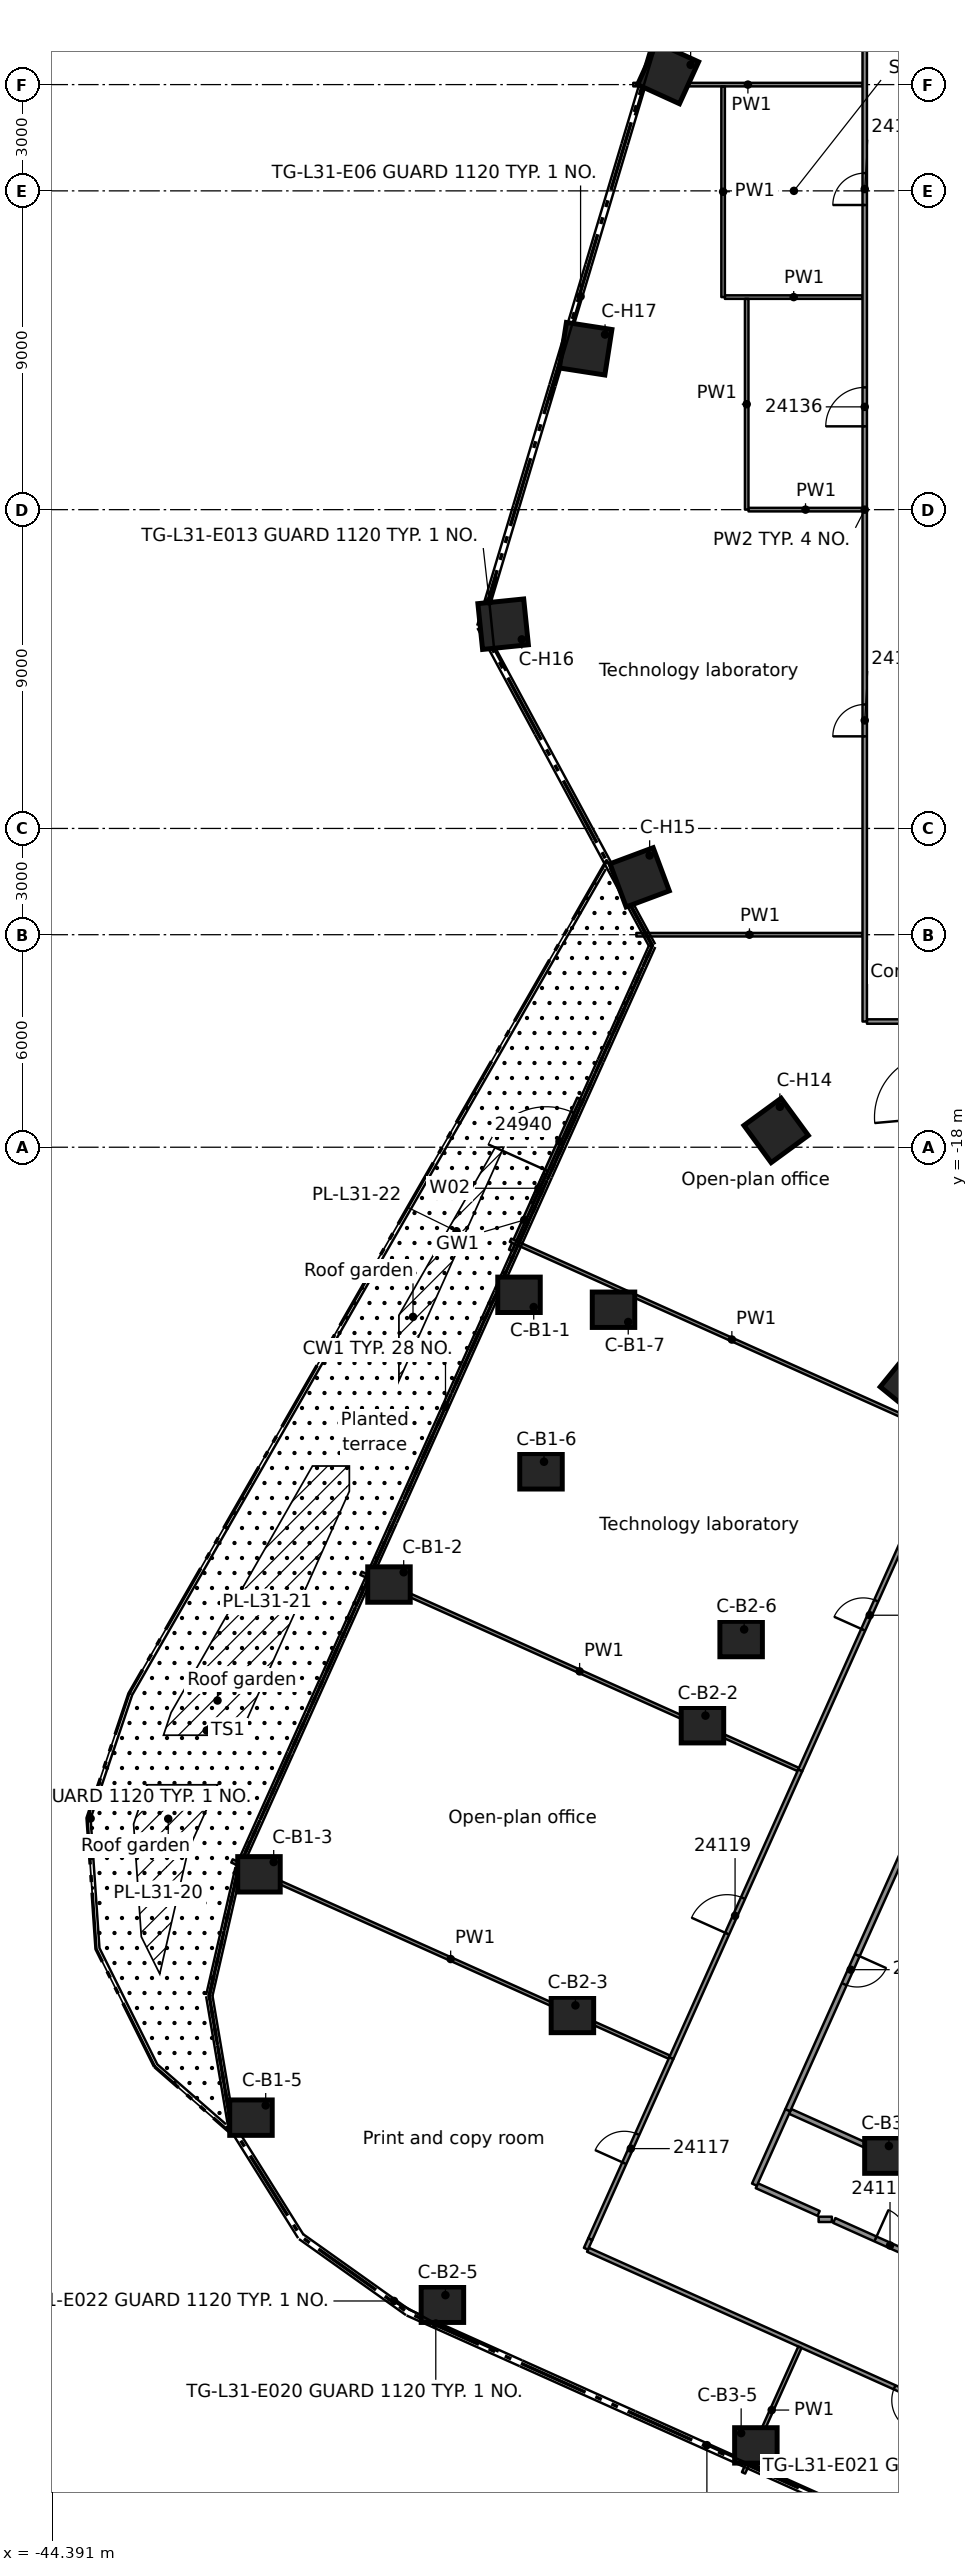
"""IFC4 building model, lengths in metres.
Left out: names, types, materials, properties, quantities, classifications, styles, units other than length and angle.
Written with IfcOpenShell. Run it as: python <this file> out.ifc"""

import sys

from ifc_helpers import new_model, si_unit, direction, frame, frame_2d, origin, origin_2d, place, context, subcontext, project, spatial, rectangle, extrude, element, fill, save


model = new_model("IFC4")
c1 = context("Model", 3, precision=1e-05, world=origin(), true_north=direction((0.0, 1.0)))
c2 = subcontext(c1, "Body", "Model", "MODEL_VIEW")
j1 = project(units=[si_unit("LENGTHUNIT", "METRE"), si_unit("PLANEANGLEUNIT", "RADIAN")], contexts=[c1])
p1 = place(None, origin())
s1 = spatial("IfcSite", under=j1, at=p1, CompositionType="ELEMENT")
p2 = place(p1, origin())
s2 = spatial("IfcBuilding", under=s1, at=p2, CompositionType="ELEMENT")
p3 = place(p2, frame((0.0, 0.0, 123.7)))
s3 = spatial("IfcBuildingStorey", under=s2, at=p3, CompositionType="ELEMENT", Elevation=123.7)
for number, where, z_axis, x_axis in (
    (1, (-31.21, -22.166, 0.0), (0.0, 0.0, 1.0), (1.0, 0.0, 0.0)),
    (2, (-34.881, -30.346, 0.0), (0.0, 0.0, 1.0), (1.0, 0.0, 0.0)),
    (3, (-38.551, -38.527, 0.0), (0.0, 0.0, 1.0), (1.0, 0.0, 0.0)),
    (4, (-38.777, -45.397, 0.0), (0.0, 0.0, 1.0), (1.0, 0.0, 0.0)),
    (5, (-30.589, -27.15, 0.0), (0.0, 0.0, 1.0), (1.0, 0.0, 0.0)),
    (6, (-28.542, -22.588, 0.0), (0.0, 0.0, 1.0), (1.0, 0.0, 0.0)),
    (7, (-26.031, -34.318, 0.0), (0.0, 0.0, 1.0), (1.0, 0.0, 0.0)),
    (8, (-29.702, -42.498, 0.0), (0.0, 0.0, 1.0), (1.0, 0.0, 0.0)),
    (9, (-33.372, -50.679, 0.0), (0.0, 0.0, 1.0), (1.0, 0.0, 0.0)),
    (10, (-24.939, -31.885, 0.0), (0.0, 0.0, 1.0), (1.0, 0.0, 0.0)),
    (11, (-20.852, -46.469, 0.0), (0.0, 0.0, 1.0), (1.0, 0.0, 0.0)),
    (12, (-24.523, -54.65, 0.0), (0.0, 0.0, 1.0), (1.0, 0.0, 0.0)),
):
    element("IfcColumn", number, at=place(p3, frame(where, z_axis=z_axis, x_axis=x_axis)), inside=s3, PredefinedType="COLUMN", context=c2, shape_type="SweptSolid", body=[
        extrude(rectangle(XDim=1.2, YDim=1.0, at=origin_2d()), origin(), (0.0, 0.0, 1.0), 3.5),
    ])
for number, where, z_axis, x_axis in (
    (13, (-20.098, -24.672, 0.0), (0.0, 0.0, 1.0), (-0.632, -0.775, 0.0)),
    (14, (-23.951, -17.526, 0.0), (0.0, 0.0, 1.0), (-0.807, -0.591, 0.0)),
    (15, (-27.804, -10.38, 0.0), (0.0, 0.0, 1.0), (-0.937, -0.35, 0.0)),
    (16, (-31.658, -3.234, 0.0), (0.0, 0.0, 1.0), (-0.995, -0.102, 0.0)),
    (17, (-29.329, 4.543, 0.0), (0.0, 0.0, 1.0), (-0.988, 0.153, 0.0)),
    (18, (-27.001, 12.321, 0.0), (0.0, 0.0, 1.0), (-0.91, 0.415, 0.0)),
):
    element("IfcColumn", number, at=place(p3, frame(where, z_axis=z_axis, x_axis=x_axis)), inside=s3, PredefinedType="COLUMN", context=c2, shape_type="SweptSolid", body=[
        extrude(rectangle(XDim=1.3, YDim=1.3, at=origin_2d()), origin(), (0.0, 0.0, 1.0), 3.5),
    ])
p4 = place(p3, frame((-31.447, -20.912, 0.0), z_axis=(0.0, 0.0, 1.0), x_axis=(0.409400034272, 0.912354981319, 0.0)))
e19 = element("IfcWall", 19, at=p4, inside=s3, PredefinedType="STANDARD", context=c2, shape_type="SweptSolid", body=[
    extrude(rectangle(XDim=4.705, YDim=0.1, at=frame_2d((2.353, 0.0))), origin(), (0.0, 0.0, 1.0), 3.1),
])
p5 = place(p4, frame((2.472, 0.0, 0.0)))
e20 = element("IfcOpeningElement", 20, at=p5, cuts=e19, PredefinedType="OPENING", context=c2, shape_type="SweptSolid", body=[
    extrude(rectangle(XDim=1.8, YDim=2.4, at=frame_2d((0.9, 1.2))), frame((0.0, 0.06, 0.0), z_axis=(0.0, -1.0, 0.0), x_axis=(1.0, 0.0, 0.0)), (0.0, 0.0, 1.0), 0.12),
])
p6 = place(p4, frame((1.472, 0.0, 0.0)))
e21 = element("IfcOpeningElement", 21, at=p6, cuts=e19, PredefinedType="OPENING", context=c2, shape_type="SweptSolid", body=[
    extrude(rectangle(XDim=0.9, YDim=2.4, at=frame_2d((0.45, 1.2))), frame((0.0, 0.06, 0.0), z_axis=(0.0, -1.0, 0.0), x_axis=(1.0, 0.0, 0.0)), (0.0, 0.0, 1.0), 0.12),
])
p7 = place(p3, frame((-17.239, -54.521, 0.0), z_axis=(0.0, 0.0, 1.0), x_axis=(-0.912380528424, 0.409343097355, 0.0)))
e22 = element("IfcWall", 22, at=p7, inside=s3, PredefinedType="PARTITIONING", context=c2, shape_type="SweptSolid", body=[
    extrude(rectangle(XDim=13.18, YDim=0.125, at=frame_2d((6.59, 0.0))), origin(), (0.0, 0.0, 1.0), 3.08),
])
p8 = place(p7, frame((2.792, 0.0, 0.0)))
e23 = element("IfcOpeningElement", 23, at=p8, cuts=e22, PredefinedType="OPENING", context=c2, shape_type="SweptSolid", body=[
    extrude(rectangle(XDim=0.9, YDim=2.1, at=frame_2d((0.45, 1.05))), frame((0.0, 0.073, 0.0), z_axis=(0.0, -1.0, 0.0), x_axis=(1.0, 0.0, 0.0)), (0.0, 0.0, 1.0), 0.145),
])
p9 = place(p3, frame((-24.496, -47.319, 0.0), z_axis=(0.0, 0.0, 1.0), x_axis=(0.912484662613, -0.409110914663, 0.0)))
e24 = element("IfcWall", 24, at=p9, inside=s3, PredefinedType="PARTITIONING", context=c2, shape_type="SweptSolid", body=[
    extrude(rectangle(XDim=1.911, YDim=0.15, at=frame_2d((0.956, 0.0))), origin(), (0.0, 0.0, 1.0), 3.08),
])
p10 = place(p3, frame((-22.31, -48.3, 0.0), z_axis=(0.0, 0.0, 1.0), x_axis=(0.912496069824, -0.409085470966, 0.0)))
e25 = element("IfcWall", 25, at=p10, inside=s3, PredefinedType="PARTITIONING", context=c2, shape_type="SweptSolid", body=[
    extrude(rectangle(XDim=3.556, YDim=0.15, at=frame_2d((1.778, 0.0))), origin(), (0.0, 0.0, 1.0), 3.08),
])
p11 = place(p10, frame((1.275, 0.0, 0.0)))
e26 = element("IfcOpeningElement", 26, at=p11, cuts=e25, PredefinedType="OPENING", context=c2, shape_type="SweptSolid", body=[
    extrude(rectangle(XDim=0.9, YDim=2.1, at=frame_2d((0.45, 1.05))), frame((0.0, 0.085, 0.0), z_axis=(0.0, -1.0, 0.0), x_axis=(1.0, 0.0, 0.0)), (0.0, 0.0, 1.0), 0.17),
])
p12 = place(p3, frame((-39.313, -38.149, 0.0), z_axis=(0.0, 0.0, 1.0), x_axis=(0.912365533099, -0.409376518638, 0.0)))
e27 = element("IfcWall", 27, at=p12, inside=s3, PredefinedType="PARTITIONING", context=c2, shape_type="SweptSolid", body=[
    extrude(rectangle(XDim=13.533, YDim=0.1, at=frame_2d((6.767, 0.0))), origin(), (0.0, 0.0, 1.0), 3.08),
])
p13 = place(p3, frame((-23.556, -45.22, 0.0), z_axis=(0.0, 0.0, 1.0), x_axis=(0.912409553787, -0.409278396886, 0.0)))
e28 = element("IfcWall", 28, at=p13, inside=s3, PredefinedType="PARTITIONING", context=c2, shape_type="SweptSolid", body=[
    extrude(rectangle(XDim=5.954, YDim=0.15, at=frame_2d((2.977, 0.0))), origin(), (0.0, 0.0, 1.0), 3.08),
])
p14 = place(p3, frame((-35.67, -30.029, 0.0), z_axis=(0.0, 0.0, 1.0), x_axis=(0.912365708641, -0.409376127413, 0.0)))
e29 = element("IfcWall", 29, at=p14, inside=s3, PredefinedType="PARTITIONING", context=c2, shape_type="SweptSolid", body=[
    extrude(rectangle(XDim=13.528, YDim=0.1, at=frame_2d((6.764, 0.0))), origin(), (0.0, 0.0, 1.0), 3.08),
])
p15 = place(p3, frame((-31.45, -20.625, 0.0), z_axis=(0.0, 0.0, 1.0), x_axis=(0.912363829072, -0.409380316334, 0.0)))
e30 = element("IfcWall", 30, at=p15, inside=s3, PredefinedType="PARTITIONING", context=c2, shape_type="SweptSolid", body=[
    extrude(rectangle(XDim=13.698, YDim=0.1, at=frame_2d((6.849, 0.0))), origin(), (0.0, 0.0, 1.0), 3.08),
])
p16 = place(p3, frame((-22.752, -48.268, 0.0), z_axis=(0.0, 0.0, 1.0), x_axis=(1.0, 0.0, 0.0)))
e31 = element("IfcWall", 31, at=p16, inside=s3, PredefinedType="PARTITIONING", context=c2, shape_type="SweptSolid", body=[
    extrude(rectangle(XDim=0.374, YDim=0.15, at=frame_2d((0.187, 0.0))), origin(), (0.0, 0.0, 1.0), 3.08),
])
p17 = place(p3, frame((-21.387, -14.451, 0.0), z_axis=(0.0, 0.0, 1.0), x_axis=(1.0, 0.0, 0.0)))
e32 = element("IfcWall", 32, at=p17, inside=s3, PredefinedType="PARTITIONING", context=c2, shape_type="SweptSolid", body=[
    extrude(rectangle(XDim=1.771, YDim=0.125, at=frame_2d((0.885, 0.0))), origin(), (0.0, 0.0, 1.0), 3.08),
])
p18 = place(p3, frame((-27.897, -12.0, 0.0), z_axis=(0.0, 0.0, 1.0), x_axis=(1.0, 0.0, 0.0)))
e33 = element("IfcWall", 33, at=p18, inside=s3, PredefinedType="PARTITIONING", context=c2, shape_type="SweptSolid", body=[
    extrude(rectangle(XDim=6.385, YDim=0.1, at=frame_2d((3.192, 0.0))), origin(), (0.0, 0.0, 1.0), 3.08),
])
p19 = place(p3, frame((-24.731, 0.001, 0.0), z_axis=(0.0, 0.0, 1.0), x_axis=(1.0, 0.0, 0.0)))
e34 = element("IfcWall", 34, at=p19, inside=s3, PredefinedType="PARTITIONING", context=c2, shape_type="SweptSolid", body=[
    extrude(rectangle(XDim=3.219, YDim=0.1, at=frame_2d((1.609, 0.0))), origin(), (0.0, 0.0, 1.0), 3.08),
])
p20 = place(p3, frame((-25.398, 6.001, 0.0), z_axis=(0.0, 0.0, 1.0), x_axis=(1.0, 0.0, 0.0)))
e35 = element("IfcWall", 35, at=p20, inside=s3, PredefinedType="PARTITIONING", context=c2, shape_type="SweptSolid", body=[
    extrude(rectangle(XDim=3.886, YDim=0.1, at=frame_2d((1.943, 0.0))), origin(), (0.0, 0.0, 1.0), 3.08),
])
p21 = place(p3, frame((-27.984, 12.0, 0.0), z_axis=(0.0, 0.0, 1.0), x_axis=(1.0, 0.0, 0.0)))
e36 = element("IfcWall", 36, at=p21, inside=s3, PredefinedType="PARTITIONING", context=c2, shape_type="SweptSolid", body=[
    extrude(rectangle(XDim=6.472, YDim=0.1, at=frame_2d((3.236, 0.0))), origin(), (0.0, 0.0, 1.0), 3.08),
])
p22 = place(p3, frame((-24.871, -55.425, 0.0), z_axis=(0.0, 0.0, 1.0), x_axis=(0.409358881384, 0.912373446694, 0.0)))
e37 = element("IfcWall", 37, at=p22, inside=s3, PredefinedType="PARTITIONING", context=c2, shape_type="SweptSolid", body=[
    extrude(rectangle(XDim=3.887, YDim=0.1, at=frame_2d((1.943, 0.0))), origin(), (0.0, 0.0, 1.0), 3.08),
])
p23 = place(p3, frame((-14.393, -24.585, 0.0), z_axis=(0.0, 0.0, 1.0), x_axis=(-0.408859666491, -0.912597267756, 0.0)))
e38 = element("IfcWall", 38, at=p23, inside=s3, PredefinedType="PARTITIONING", context=c2, shape_type="SweptSolid", body=[
    extrude(rectangle(XDim=22.577, YDim=0.15, at=frame_2d((11.289, 0.0))), origin(), (0.0, 0.0, 1.0), 3.08),
])
p24 = place(p23, frame((17.777, 0.0, 0.0)))
e39 = element("IfcOpeningElement", 39, at=p24, cuts=e38, PredefinedType="OPENING", context=c2, shape_type="SweptSolid", body=[
    extrude(rectangle(XDim=0.9, YDim=2.1, at=frame_2d((0.45, 1.05))), frame((0.0, 0.085, 0.0), z_axis=(0.0, -1.0, 0.0), x_axis=(1.0, 0.0, 0.0)), (0.0, 0.0, 1.0), 0.17),
])
p25 = place(p3, frame((-24.564, -47.288, 0.0), z_axis=(0.0, 0.0, 1.0), x_axis=(0.408677932569, 0.912678666033, 0.0)))
e40 = element("IfcWall", 40, at=p25, inside=s3, PredefinedType="PARTITIONING", context=c2, shape_type="SweptSolid", body=[
    extrude(rectangle(XDim=2.3, YDim=0.15, at=frame_2d((1.15, 0.0))), origin(), (0.0, 0.0, 1.0), 3.08),
])
p26 = place(p3, frame((-29.199, -48.826, 0.0), z_axis=(0.0, 0.0, 1.0), x_axis=(0.408903193062, 0.912577765839, 0.0)))
e41 = element("IfcWall", 41, at=p26, inside=s3, PredefinedType="PARTITIONING", context=c2, shape_type="SweptSolid", body=[
    extrude(rectangle(XDim=5.6, YDim=0.125, at=frame_2d((2.8, 0.0))), origin(), (0.0, 0.0, 1.0), 3.08),
])
p27 = place(p26, frame((2.35, 0.0, 0.0)))
e42 = element("IfcOpeningElement", 42, at=p27, cuts=e41, PredefinedType="OPENING", context=c2, shape_type="SweptSolid", body=[
    extrude(rectangle(XDim=0.9, YDim=2.1, at=frame_2d((0.45, 1.05))), frame((0.0, 0.073, 0.0), z_axis=(0.0, -1.0, 0.0), x_axis=(1.0, 0.0, 0.0)), (0.0, 0.0, 1.0), 0.145),
])
p28 = place(p3, frame((-23.271, -35.593, 0.0), z_axis=(0.0, 0.0, 1.0), x_axis=(0.408848301026, 0.9126023596, 0.0)))
e43 = element("IfcWall", 43, at=p28, inside=s3, PredefinedType="PARTITIONING", context=c2, shape_type="SweptSolid", body=[
    extrude(rectangle(XDim=9.59, YDim=0.125, at=frame_2d((4.795, 0.0))), origin(), (0.0, 0.0, 1.0), 3.08),
])
p29 = place(p28, frame((4.35, 0.0, 0.0)))
e44 = element("IfcOpeningElement", 44, at=p29, cuts=e43, PredefinedType="OPENING", context=c2, shape_type="SweptSolid", body=[
    extrude(rectangle(XDim=0.9, YDim=2.1, at=frame_2d((0.45, 1.05))), frame((0.0, 0.073, 0.0), z_axis=(0.0, -1.0, 0.0), x_axis=(1.0, 0.0, 0.0)), (0.0, 0.0, 1.0), 0.145),
])
p30 = place(p3, frame((-26.909, -43.715, 0.0), z_axis=(0.0, 0.0, 1.0), x_axis=(0.408776260382, 0.912634630588, 0.0)))
e45 = element("IfcWall", 45, at=p30, inside=s3, PredefinedType="PARTITIONING", context=c2, shape_type="SweptSolid", body=[
    extrude(rectangle(XDim=8.9, YDim=0.125, at=frame_2d((4.45, 0.0))), origin(), (0.0, 0.0, 1.0), 3.08),
])
p31 = place(p30, frame((3.85, 0.0, 0.0)))
e46 = element("IfcOpeningElement", 46, at=p31, cuts=e45, PredefinedType="OPENING", context=c2, shape_type="SweptSolid", body=[
    extrude(rectangle(XDim=1.1, YDim=2.1, at=frame_2d((0.55, 1.05))), frame((0.0, 0.073, 0.0), z_axis=(0.0, -1.0, 0.0), x_axis=(1.0, 0.0, 0.0)), (0.0, 0.0, 1.0), 0.145),
])
p32 = place(p3, frame((-29.321, -49.099, 0.0), z_axis=(0.0, 0.0, 1.0), x_axis=(0.407954532979, 0.913002244807, 0.0)))
e47 = element("IfcWall", 47, at=p32, inside=s3, PredefinedType="PARTITIONING", context=c2, shape_type="SweptSolid", body=[
    extrude(rectangle(XDim=0.299, YDim=0.125, at=frame_2d((0.15, 0.0))), origin(), (0.0, 0.0, 1.0), 3.08),
])
p33 = place(p3, frame((-21.45, -14.451, 0.0), z_axis=(0.0, 0.0, 1.0), x_axis=(0.0, 1.0, 0.0)))
e48 = element("IfcWall", 48, at=p33, inside=s3, PredefinedType="PARTITIONING", context=c2, shape_type="SweptSolid", body=[
    extrude(rectangle(XDim=28.902, YDim=0.125, at=frame_2d((14.451, 0.0))), origin(), (0.0, 0.0, 1.0), 3.08),
])
p34 = place(p33, frame((8.051, 0.0, 0.0)))
e49 = element("IfcOpeningElement", 49, at=p34, cuts=e48, PredefinedType="OPENING", context=c2, shape_type="SweptSolid", body=[
    extrude(rectangle(XDim=0.9, YDim=2.1, at=frame_2d((0.45, 1.05))), frame((0.0, 0.073, 0.0), z_axis=(0.0, -1.0, 0.0), x_axis=(1.0, 0.0, 0.0)), (0.0, 0.0, 1.0), 0.145),
])
p35 = place(p33, frame((23.052, 0.0, 0.0)))
e50 = element("IfcOpeningElement", 50, at=p35, cuts=e48, PredefinedType="OPENING", context=c2, shape_type="SweptSolid", body=[
    extrude(rectangle(XDim=0.9, YDim=2.1, at=frame_2d((0.45, 1.05))), frame((0.0, 0.073, 0.0), z_axis=(0.0, -1.0, 0.0), x_axis=(1.0, 0.0, 0.0)), (0.0, 0.0, 1.0), 0.145),
])
p36 = place(p33, frame((16.803, 0.0, 0.0)))
e51 = element("IfcOpeningElement", 51, at=p36, cuts=e48, PredefinedType="OPENING", context=c2, shape_type="SweptSolid", body=[
    extrude(rectangle(XDim=1.1, YDim=2.1, at=frame_2d((0.55, 1.05))), frame((0.0, 0.073, 0.0), z_axis=(0.0, -1.0, 0.0), x_axis=(1.0, 0.0, 0.0)), (0.0, 0.0, 1.0), 0.145),
])
for number, where, z_axis, x_axis in (
    (52, (-24.782, 0.002, 0.0), (0.0, 0.0, 1.0), (0.0, 1.0, 0.0)),
    (53, (-25.448, 6.001, 0.0), (0.0, 0.0, 1.0), (0.0, 1.0, 0.0)),
):
    element("IfcWall", number, at=place(p3, frame(where, z_axis=z_axis, x_axis=x_axis)), inside=s3, PredefinedType="PARTITIONING", context=c2, shape_type="SweptSolid", body=[
        extrude(rectangle(XDim=5.949, YDim=0.1, at=frame_2d((2.975, 0.0))), origin(), (0.0, 0.0, 1.0), 3.08),
    ])
p37 = place(p5, origin())
e54 = element("IfcDoor", 54, at=p37, inside=s3, OperationType="DOUBLE_DOOR_SINGLE_SWING", PredefinedType="DOOR", context=c2, shape_type="SweptSolid", body=[
    extrude(rectangle(XDim=1.8, YDim=2.4, at=frame_2d((0.9, 1.2))), frame((0.0, 0.025, 0.0), z_axis=(0.0, -1.0, 0.0), x_axis=(1.0, 0.0, 0.0)), (0.0, 0.0, 1.0), 0.05),
])
fill(e20, e54)
p38 = place(p6, origin())
e55 = element("IfcWindow", 55, at=p38, inside=s3, PartitioningType="SINGLE_PANEL", PredefinedType="WINDOW", context=c2, shape_type="SweptSolid", body=[
    extrude(rectangle(XDim=0.9, YDim=2.4, at=frame_2d((0.45, 1.2))), frame((0.0, 0.03, 0.0), z_axis=(0.0, -1.0, 0.0), x_axis=(1.0, 0.0, 0.0)), (0.0, 0.0, 1.0), 0.06),
])
fill(e21, e55)
p39 = place(p11, origin())
e56 = element("IfcDoor", 56, at=p39, inside=s3, OperationType="SINGLE_SWING_LEFT", PredefinedType="DOOR", context=c2, shape_type="SweptSolid", body=[
    extrude(rectangle(XDim=0.9, YDim=2.1, at=frame_2d((0.45, 1.05))), frame((0.0, 0.025, 0.0), z_axis=(0.0, -1.0, 0.0), x_axis=(1.0, 0.0, 0.0)), (0.0, 0.0, 1.0), 0.05),
])
fill(e26, e56)
p40 = place(p24, origin())
e57 = element("IfcDoor", 57, at=p40, inside=s3, OperationType="SINGLE_SWING_RIGHT", PredefinedType="DOOR", context=c2, shape_type="SweptSolid", body=[
    extrude(rectangle(XDim=0.9, YDim=2.1, at=frame_2d((0.45, 1.05))), frame((0.0, 0.025, 0.0), z_axis=(0.0, -1.0, 0.0), x_axis=(1.0, 0.0, 0.0)), (0.0, 0.0, 1.0), 0.05),
])
fill(e39, e57)
p41 = place(p8, origin())
e58 = element("IfcDoor", 58, at=p41, inside=s3, OperationType="SINGLE_SWING_LEFT", PredefinedType="DOOR", context=c2, shape_type="SweptSolid", body=[
    extrude(rectangle(XDim=0.9, YDim=2.1, at=frame_2d((0.45, 1.05))), frame((0.0, 0.025, 0.0), z_axis=(0.0, -1.0, 0.0), x_axis=(1.0, 0.0, 0.0)), (0.0, 0.0, 1.0), 0.05),
])
fill(e23, e58)
p42 = place(p27, origin())
e59 = element("IfcDoor", 59, at=p42, inside=s3, OperationType="SINGLE_SWING_LEFT", PredefinedType="DOOR", context=c2, shape_type="SweptSolid", body=[
    extrude(rectangle(XDim=0.9, YDim=2.1, at=frame_2d((0.45, 1.05))), frame((0.0, 0.025, 0.0), z_axis=(0.0, -1.0, 0.0), x_axis=(1.0, 0.0, 0.0)), (0.0, 0.0, 1.0), 0.05),
])
fill(e42, e59)
p43 = place(p29, origin())
e60 = element("IfcDoor", 60, at=p43, inside=s3, OperationType="SINGLE_SWING_RIGHT", PredefinedType="DOOR", context=c2, shape_type="SweptSolid", body=[
    extrude(rectangle(XDim=0.9, YDim=2.1, at=frame_2d((0.45, 1.05))), frame((0.0, 0.025, 0.0), z_axis=(0.0, -1.0, 0.0), x_axis=(1.0, 0.0, 0.0)), (0.0, 0.0, 1.0), 0.05),
])
fill(e44, e60)
p44 = place(p31, origin())
e61 = element("IfcDoor", 61, at=p44, inside=s3, OperationType="SINGLE_SWING_LEFT", PredefinedType="DOOR", context=c2, shape_type="SweptSolid", body=[
    extrude(rectangle(XDim=1.1, YDim=2.1, at=frame_2d((0.55, 1.05))), frame((0.0, 0.025, 0.0), z_axis=(0.0, -1.0, 0.0), x_axis=(1.0, 0.0, 0.0)), (0.0, 0.0, 1.0), 0.05),
])
fill(e46, e61)
p45 = place(p34, origin())
e62 = element("IfcDoor", 62, at=p45, inside=s3, OperationType="SINGLE_SWING_LEFT", PredefinedType="DOOR", context=c2, shape_type="SweptSolid", body=[
    extrude(rectangle(XDim=0.9, YDim=2.1, at=frame_2d((0.45, 1.05))), frame((0.0, 0.025, 0.0), z_axis=(0.0, -1.0, 0.0), x_axis=(1.0, 0.0, 0.0)), (0.0, 0.0, 1.0), 0.05),
])
fill(e49, e62)
p46 = place(p35, origin())
e63 = element("IfcDoor", 63, at=p46, inside=s3, OperationType="SINGLE_SWING_RIGHT", PredefinedType="DOOR", context=c2, shape_type="SweptSolid", body=[
    extrude(rectangle(XDim=0.9, YDim=2.1, at=frame_2d((0.45, 1.05))), frame((0.0, 0.025, 0.0), z_axis=(0.0, -1.0, 0.0), x_axis=(1.0, 0.0, 0.0)), (0.0, 0.0, 1.0), 0.05),
])
fill(e50, e63)
p47 = place(p36, origin())
e64 = element("IfcDoor", 64, at=p47, inside=s3, OperationType="SINGLE_SWING_RIGHT", PredefinedType="DOOR", context=c2, shape_type="SweptSolid", body=[
    extrude(rectangle(XDim=1.1, YDim=2.1, at=frame_2d((0.55, 1.05))), frame((0.0, 0.025, 0.0), z_axis=(0.0, -1.0, 0.0), x_axis=(1.0, 0.0, 0.0)), (0.0, 0.0, 1.0), 0.05),
])
fill(e51, e64)
save(model, sys.argv[1])
